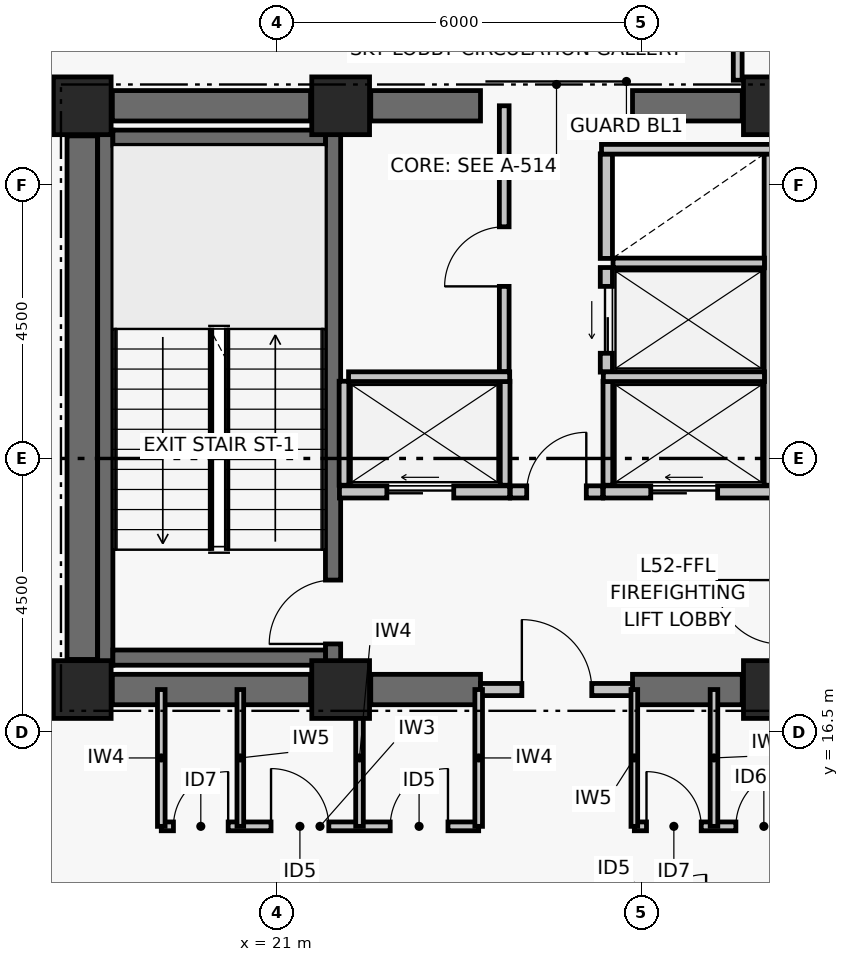
"""IFC4 building model, lengths in metres.
Left out: names, types, materials, properties, quantities, classifications, styles, units other than length and angle.
Written with IfcOpenShell. Run it as: python <this file> out.ifc"""

import sys

from ifc_helpers import new_model, si_unit, direction, frame, frame_2d, origin, origin_2d, place, context, subcontext, project, spatial, rectangle, extrude, element, fill, save


model = new_model("IFC4")
c1 = context("Model", 3, precision=1e-05, world=origin(), true_north=direction((0.0, 1.0)))
c2 = subcontext(c1, "Body", "Model", "MODEL_VIEW")
j1 = project(units=[si_unit("LENGTHUNIT", "METRE"), si_unit("PLANEANGLEUNIT", "RADIAN")], contexts=[c1])
p1 = place(None, origin())
s1 = spatial("IfcSite", under=j1, at=p1, CompositionType="ELEMENT")
p2 = place(p1, origin())
s2 = spatial("IfcBuilding", under=s1, at=p2, CompositionType="ELEMENT")
p3 = place(p2, frame((0.0, 0.0, 206.4)))
s3 = spatial("IfcBuildingStorey", under=s2, at=p3, CompositionType="ELEMENT", Elevation=206.4)
for number, where, z_axis, x_axis in (
    (1, (17.8, 17.2, 0.0), (0.0, 0.0, 1.0), (1.0, 0.0, 0.0)),
    (2, (22.05, 17.2, 0.0), (0.0, 0.0, 1.0), (1.0, 0.0, 0.0)),
    (3, (29.15, 17.2, 0.0), (0.0, 0.0, 1.0), (1.0, 0.0, 0.0)),
    (4, (17.8, 26.8, 0.0), (0.0, 0.0, 1.0), (1.0, 0.0, 0.0)),
    (5, (22.05, 26.8, 0.0), (0.0, 0.0, 1.0), (1.0, 0.0, 0.0)),
    (6, (29.15, 26.8, 0.0), (0.0, 0.0, 1.0), (1.0, 0.0, 0.0)),
):
    element("IfcColumn", number, at=place(p3, frame(where, z_axis=z_axis, x_axis=x_axis)), inside=s3, PredefinedType="COLUMN", context=c2, shape_type="SweptSolid", body=[
        extrude(rectangle(XDim=0.95, YDim=0.95, at=origin_2d()), origin(), (0.0, 0.0, 1.0), 3.72),
    ])
p4 = place(p3, frame((18.295, 17.2, 0.0), z_axis=(0.0, 0.0, 1.0), x_axis=(1.0, 0.0, 0.0)))
e7 = element("IfcWall", 7, at=p4, inside=s3, PredefinedType="SHEAR", context=c2, shape_type="SweptSolid", body=[
    extrude(rectangle(XDim=3.26, YDim=0.5, at=frame_2d((1.63, 0.0))), origin(), (0.0, 0.0, 1.0), 3.5),
])
p5 = place(p3, frame((22.545, 17.2, 0.0), z_axis=(0.0, 0.0, 1.0), x_axis=(1.0, 0.0, 0.0)))
e8 = element("IfcWall", 8, at=p5, inside=s3, PredefinedType="SHEAR", context=c2, shape_type="SweptSolid", body=[
    extrude(rectangle(XDim=1.805, YDim=0.5, at=frame_2d((0.903, 0.0))), origin(), (0.0, 0.0, 1.0), 3.5),
])
p6 = place(p3, frame((26.85, 17.2, 0.0), z_axis=(0.0, 0.0, 1.0), x_axis=(1.0, 0.0, 0.0)))
e9 = element("IfcWall", 9, at=p6, inside=s3, PredefinedType="SHEAR", context=c2, shape_type="SweptSolid", body=[
    extrude(rectangle(XDim=1.805, YDim=0.5, at=frame_2d((0.902, 0.0))), origin(), (0.0, 0.0, 1.0), 3.5),
])
p7 = place(p3, frame((18.295, 26.8, 0.0), z_axis=(0.0, 0.0, 1.0), x_axis=(1.0, 0.0, 0.0)))
e10 = element("IfcWall", 10, at=p7, inside=s3, PredefinedType="SHEAR", context=c2, shape_type="SweptSolid", body=[
    extrude(rectangle(XDim=3.26, YDim=0.5, at=frame_2d((1.63, 0.0))), origin(), (0.0, 0.0, 1.0), 3.5),
])
p8 = place(p3, frame((22.545, 26.8, 0.0), z_axis=(0.0, 0.0, 1.0), x_axis=(1.0, 0.0, 0.0)))
e11 = element("IfcWall", 11, at=p8, inside=s3, PredefinedType="SHEAR", context=c2, shape_type="SweptSolid", body=[
    extrude(rectangle(XDim=1.805, YDim=0.5, at=frame_2d((0.903, 0.0))), origin(), (0.0, 0.0, 1.0), 3.5),
])
p9 = place(p3, frame((26.85, 26.8, 0.0), z_axis=(0.0, 0.0, 1.0), x_axis=(1.0, 0.0, 0.0)))
e12 = element("IfcWall", 12, at=p9, inside=s3, PredefinedType="SHEAR", context=c2, shape_type="SweptSolid", body=[
    extrude(rectangle(XDim=1.805, YDim=0.5, at=frame_2d((0.902, 0.0))), origin(), (0.0, 0.0, 1.0), 3.5),
])
p10 = place(p3, frame((17.8, 17.695, 0.0), z_axis=(0.0, 0.0, 1.0), x_axis=(0.0, 1.0, 0.0)))
e13 = element("IfcWall", 13, at=p10, inside=s3, PredefinedType="SHEAR", context=c2, shape_type="SweptSolid", body=[
    extrude(rectangle(XDim=8.61, YDim=0.5, at=frame_2d((4.305, 0.0))), origin(), (0.0, 0.0, 1.0), 3.5),
])
p11 = place(p3, frame((18.179, 17.6, 0.0), z_axis=(0.0, 0.0, 1.0), x_axis=(0.0, 1.0, 0.0)))
e14 = element("IfcWall", 14, at=p11, inside=s3, PredefinedType="SHEAR", context=c2, shape_type="SweptSolid", body=[
    extrude(rectangle(XDim=8.8, YDim=0.25, at=frame_2d((4.4, 0.0))), origin(), (0.0, 0.0, 1.0), 3.5),
])
p12 = place(p3, frame((21.925, 17.6, 0.0), z_axis=(0.0, 0.0, 1.0), x_axis=(0.0, 1.0, 0.0)))
e15 = element("IfcWall", 15, at=p12, inside=s3, PredefinedType="SHEAR", context=c2, shape_type="SweptSolid", body=[
    extrude(rectangle(XDim=8.8, YDim=0.25, at=frame_2d((4.4, 0.0))), origin(), (0.0, 0.0, 1.0), 3.5),
])
p13 = place(p12, frame((0.35, 0.0, 0.0)))
e16 = element("IfcOpeningElement", 16, at=p13, cuts=e15, PredefinedType="OPENING", context=c2, shape_type="SweptSolid", body=[
    extrude(rectangle(XDim=1.05, YDim=2.08, at=frame_2d((0.525, 1.04))), frame((0.0, 0.135, 0.0), z_axis=(0.0, -1.0, 0.0), x_axis=(1.0, 0.0, 0.0)), (0.0, 0.0, 1.0), 0.27),
])
for number, where, z_axis, x_axis in (
    (17, (18.304, 17.725, 0.0), (0.0, 0.0, 1.0), (1.0, 0.0, 0.0)),
    (18, (18.304, 26.275, 0.0), (0.0, 0.0, 1.0), (1.0, 0.0, 0.0)),
):
    element("IfcWall", number, at=place(p3, frame(where, z_axis=z_axis, x_axis=x_axis)), inside=s3, PredefinedType="SHEAR", context=c2, shape_type="SweptSolid", body=[
        extrude(rectangle(XDim=3.496, YDim=0.25, at=frame_2d((1.748, 0.0))), origin(), (0.0, 0.0, 1.0), 3.5),
    ])
p14 = place(p3, frame((24.35, 17.2, 0.0), z_axis=(0.0, 0.0, 1.0), x_axis=(1.0, 0.0, 0.0)))
e19 = element("IfcWall", 19, at=p14, inside=s3, PredefinedType="PARTITIONING", context=c2, shape_type="SweptSolid", body=[
    extrude(rectangle(XDim=2.5, YDim=0.2, at=frame_2d((1.25, 0.0))), origin(), (0.0, 0.0, 1.0), 2.63),
])
p15 = place(p14, frame((0.68, 0.0, 0.0)))
e20 = element("IfcOpeningElement", 20, at=p15, cuts=e19, PredefinedType="OPENING", context=c2, shape_type="SweptSolid", body=[
    extrude(rectangle(XDim=1.15, YDim=2.08, at=frame_2d((0.575, 1.04))), frame((0.0, 0.11, 0.0), z_axis=(0.0, -1.0, 0.0), x_axis=(1.0, 0.0, 0.0)), (0.0, 0.0, 1.0), 0.22),
])
p16 = place(p3, frame((24.84, 20.45, 0.0), z_axis=(0.0, 0.0, 1.0), x_axis=(1.0, 0.0, 0.0)))
e21 = element("IfcWall", 21, at=p16, inside=s3, PredefinedType="PARTITIONING", context=c2, shape_type="SweptSolid", body=[
    extrude(rectangle(XDim=1.52, YDim=0.2, at=frame_2d((0.76, 0.0))), origin(), (0.0, 0.0, 1.0), 3.5),
])
p17 = place(p16, frame((0.27, 0.0, 0.0)))
e22 = element("IfcOpeningElement", 22, at=p17, cuts=e21, PredefinedType="OPENING", context=c2, shape_type="SweptSolid", body=[
    extrude(rectangle(XDim=0.98, YDim=2.06, at=frame_2d((0.49, 1.03))), frame((0.0, 0.11, 0.0), z_axis=(0.0, -1.0, 0.0), x_axis=(1.0, 0.0, 0.0)), (0.0, 0.0, 1.0), 0.22),
])
p18 = place(p3, frame((22.03, 20.45, 0.0), z_axis=(0.0, 0.0, 1.0), x_axis=(1.0, 0.0, 0.0)))
e23 = element("IfcWall", 23, at=p18, inside=s3, PredefinedType="PARTITIONING", context=c2, shape_type="SweptSolid", body=[
    extrude(rectangle(XDim=2.8, YDim=0.2, at=frame_2d((1.4, 0.0))), origin(), (0.0, 0.0, 1.0), 3.5),
])
p19 = place(p18, frame((0.78, 0.0, 0.0)))
e24 = element("IfcOpeningElement", 24, at=p19, cuts=e23, PredefinedType="OPENING", context=c2, shape_type="SweptSolid", body=[
    extrude(rectangle(XDim=1.1, YDim=2.08, at=frame_2d((0.55, 1.04))), frame((0.0, 0.11, 0.0), z_axis=(0.0, -1.0, 0.0), x_axis=(1.0, 0.0, 0.0)), (0.0, 0.0, 1.0), 0.22),
])
p20 = place(p3, frame((26.37, 20.45, 0.0), z_axis=(0.0, 0.0, 1.0), x_axis=(1.0, 0.0, 0.0)))
e25 = element("IfcWall", 25, at=p20, inside=s3, PredefinedType="PARTITIONING", context=c2, shape_type="SweptSolid", body=[
    extrude(rectangle(XDim=2.8, YDim=0.2, at=frame_2d((1.4, 0.0))), origin(), (0.0, 0.0, 1.0), 3.5),
])
p21 = place(p20, frame((0.78, 0.0, 0.0)))
e26 = element("IfcOpeningElement", 26, at=p21, cuts=e25, PredefinedType="OPENING", context=c2, shape_type="SweptSolid", body=[
    extrude(rectangle(XDim=1.1, YDim=2.08, at=frame_2d((0.55, 1.04))), frame((0.0, 0.11, 0.0), z_axis=(0.0, -1.0, 0.0), x_axis=(1.0, 0.0, 0.0)), (0.0, 0.0, 1.0), 0.22),
])
p22 = place(p3, frame((26.42, 22.42, 0.0), z_axis=(0.0, 0.0, 1.0), x_axis=(0.0, 1.0, 0.0)))
e27 = element("IfcWall", 27, at=p22, inside=s3, PredefinedType="PARTITIONING", context=c2, shape_type="SweptSolid", body=[
    extrude(rectangle(XDim=1.72, YDim=0.2, at=frame_2d((0.86, 0.0))), origin(), (0.0, 0.0, 1.0), 3.5),
])
p23 = place(p22, frame((0.31, 0.0, 0.0)))
e28 = element("IfcOpeningElement", 28, at=p23, cuts=e27, PredefinedType="OPENING", context=c2, shape_type="SweptSolid", body=[
    extrude(rectangle(XDim=1.1, YDim=2.08, at=frame_2d((0.55, 1.04))), frame((0.0, 0.11, 0.0), z_axis=(0.0, -1.0, 0.0), x_axis=(1.0, 0.0, 0.0)), (0.0, 0.0, 1.0), 0.22),
])
p24 = place(p3, frame((26.42, 24.29, 0.0), z_axis=(0.0, 0.0, 1.0), x_axis=(0.0, 1.0, 0.0)))
e29 = element("IfcWall", 29, at=p24, inside=s3, PredefinedType="PARTITIONING", context=c2, shape_type="SweptSolid", body=[
    extrude(rectangle(XDim=1.72, YDim=0.2, at=frame_2d((0.86, 0.0))), origin(), (0.0, 0.0, 1.0), 3.5),
])
for number, where, z_axis, x_axis in (
    (30, (22.105, 20.56, 0.0), (0.0, 0.0, 1.0), (0.0, 1.0, 0.0)),
    (31, (24.755, 20.56, 0.0), (0.0, 0.0, 1.0), (0.0, 1.0, 0.0)),
):
    element("IfcWall", number, at=place(p3, frame(where, z_axis=z_axis, x_axis=x_axis)), inside=s3, PredefinedType="PARTITIONING", context=c2, shape_type="SweptSolid", body=[
        extrude(rectangle(XDim=1.71, YDim=0.16, at=frame_2d((0.855, 0.0))), origin(), (0.0, 0.0, 1.0), 3.5),
    ])
p25 = place(p3, frame((22.18, 22.345, 0.0), z_axis=(0.0, 0.0, 1.0), x_axis=(1.0, 0.0, 0.0)))
e32 = element("IfcWall", 32, at=p25, inside=s3, PredefinedType="PARTITIONING", context=c2, shape_type="SweptSolid", body=[
    extrude(rectangle(XDim=2.65, YDim=0.16, at=frame_2d((1.325, 0.0))), origin(), (0.0, 0.0, 1.0), 3.5),
])
p26 = place(p3, frame((29.095, 20.56, 0.0), z_axis=(0.0, 0.0, 1.0), x_axis=(0.0, 1.0, 0.0)))
e33 = element("IfcWall", 33, at=p26, inside=s3, PredefinedType="PARTITIONING", context=c2, shape_type="SweptSolid", body=[
    extrude(rectangle(XDim=5.45, YDim=0.16, at=frame_2d((2.725, 0.0))), origin(), (0.0, 0.0, 1.0), 3.5),
])
p27 = place(p3, frame((26.445, 20.56, 0.0), z_axis=(0.0, 0.0, 1.0), x_axis=(0.0, 1.0, 0.0)))
e34 = element("IfcWall", 34, at=p27, inside=s3, PredefinedType="PARTITIONING", context=c2, shape_type="SweptSolid", body=[
    extrude(rectangle(XDim=1.71, YDim=0.16, at=frame_2d((0.855, 0.0))), origin(), (0.0, 0.0, 1.0), 3.5),
])
p28 = place(p3, frame((26.37, 22.345, 0.0), z_axis=(0.0, 0.0, 1.0), x_axis=(1.0, 0.0, 0.0)))
e35 = element("IfcWall", 35, at=p28, inside=s3, PredefinedType="PARTITIONING", context=c2, shape_type="SweptSolid", body=[
    extrude(rectangle(XDim=2.65, YDim=0.16, at=frame_2d((1.325, 0.0))), origin(), (0.0, 0.0, 1.0), 3.5),
])
p29 = place(p3, frame((26.53, 24.215, 0.0), z_axis=(0.0, 0.0, 1.0), x_axis=(1.0, 0.0, 0.0)))
e36 = element("IfcWall", 36, at=p29, inside=s3, PredefinedType="PARTITIONING", context=c2, shape_type="SweptSolid", body=[
    extrude(rectangle(XDim=2.49, YDim=0.16, at=frame_2d((1.245, 0.0))), origin(), (0.0, 0.0, 1.0), 3.5),
])
p30 = place(p3, frame((26.34, 26.085, 0.0), z_axis=(0.0, 0.0, 1.0), x_axis=(1.0, 0.0, 0.0)))
e37 = element("IfcWall", 37, at=p30, inside=s3, PredefinedType="PARTITIONING", context=c2, shape_type="SweptSolid", body=[
    extrude(rectangle(XDim=2.83, YDim=0.16, at=frame_2d((1.415, 0.0))), origin(), (0.0, 0.0, 1.0), 3.5),
])
p31 = place(p3, frame((24.74, 22.43, 0.0), z_axis=(0.0, 0.0, 1.0), x_axis=(0.0, 1.0, 0.0)))
e38 = element("IfcWall", 38, at=p31, inside=s3, PredefinedType="PARTITIONING", context=c2, shape_type="SweptSolid", body=[
    extrude(rectangle(XDim=4.37, YDim=0.16, at=frame_2d((2.185, 0.0))), origin(), (0.0, 0.0, 1.0), 2.21),
])
p32 = place(p31, frame((1.4, 0.0, 0.0)))
e39 = element("IfcOpeningElement", 39, at=p32, cuts=e38, PredefinedType="OPENING", context=c2, shape_type="SweptSolid", body=[
    extrude(rectangle(XDim=0.98, YDim=2.06, at=frame_2d((0.49, 1.03))), frame((0.0, 0.09, 0.0), z_axis=(0.0, -1.0, 0.0), x_axis=(1.0, 0.0, 0.0)), (0.0, 0.0, 1.0), 0.18),
])
p33 = place(p3, frame((19.1, 14.95, 0.0), z_axis=(0.0, 0.0, 1.0), x_axis=(1.0, 0.0, 0.0)))
e40 = element("IfcWall", 40, at=p33, inside=s3, PredefinedType="PARTITIONING", context=c2, shape_type="SweptSolid", body=[
    extrude(rectangle(XDim=5.22, YDim=0.145, at=frame_2d((2.61, 0.0))), origin(), (0.0, 0.0, 1.0), 2.73),
])
p34 = place(p33, frame((0.2, 0.0, 0.0)))
e41 = element("IfcOpeningElement", 41, at=p34, cuts=e40, PredefinedType="OPENING", context=c2, shape_type="SweptSolid", body=[
    extrude(rectangle(XDim=0.9, YDim=2.02, at=frame_2d((0.45, 1.01))), frame((0.0, 0.083, 0.0), z_axis=(0.0, -1.0, 0.0), x_axis=(1.0, 0.0, 0.0)), (0.0, 0.0, 1.0), 0.165),
])
p35 = place(p33, frame((1.805, 0.0, 0.0)))
e42 = element("IfcOpeningElement", 42, at=p35, cuts=e40, PredefinedType="OPENING", context=c2, shape_type="SweptSolid", body=[
    extrude(rectangle(XDim=0.95, YDim=2.06, at=frame_2d((0.475, 1.03))), frame((0.0, 0.083, 0.0), z_axis=(0.0, -1.0, 0.0), x_axis=(1.0, 0.0, 0.0)), (0.0, 0.0, 1.0), 0.165),
])
p36 = place(p33, frame((3.765, 0.0, 0.0)))
e43 = element("IfcOpeningElement", 43, at=p36, cuts=e40, PredefinedType="OPENING", context=c2, shape_type="SweptSolid", body=[
    extrude(rectangle(XDim=0.95, YDim=2.06, at=frame_2d((0.475, 1.03))), frame((0.0, 0.083, 0.0), z_axis=(0.0, -1.0, 0.0), x_axis=(1.0, 0.0, 0.0)), (0.0, 0.0, 1.0), 0.165),
])
p37 = place(p3, frame((26.88, 14.95, 0.0), z_axis=(0.0, 0.0, 1.0), x_axis=(1.0, 0.0, 0.0)))
e44 = element("IfcWall", 44, at=p37, inside=s3, PredefinedType="PARTITIONING", context=c2, shape_type="SweptSolid", body=[
    extrude(rectangle(XDim=4.22, YDim=0.145, at=frame_2d((2.11, 0.0))), origin(), (0.0, 0.0, 1.0), 2.93),
])
p38 = place(p37, frame((0.2, 0.0, 0.0)))
e45 = element("IfcOpeningElement", 45, at=p38, cuts=e44, PredefinedType="OPENING", context=c2, shape_type="SweptSolid", body=[
    extrude(rectangle(XDim=0.9, YDim=2.02, at=frame_2d((0.45, 1.01))), frame((0.0, 0.083, 0.0), z_axis=(0.0, -1.0, 0.0), x_axis=(1.0, 0.0, 0.0)), (0.0, 0.0, 1.0), 0.165),
])
p39 = place(p37, frame((1.67, 0.0, 0.0)))
e46 = element("IfcOpeningElement", 46, at=p39, cuts=e44, PredefinedType="OPENING", context=c2, shape_type="SweptSolid", body=[
    extrude(rectangle(XDim=0.92, YDim=2.05, at=frame_2d((0.46, 1.025))), frame((0.0, 0.083, 0.0), z_axis=(0.0, -1.0, 0.0), x_axis=(1.0, 0.0, 0.0)), (0.0, 0.0, 1.0), 0.165),
])
p40 = place(p37, frame((3.14, 0.0, 0.0)))
e47 = element("IfcOpeningElement", 47, at=p40, cuts=e44, PredefinedType="OPENING", context=c2, shape_type="SweptSolid", body=[
    extrude(rectangle(XDim=0.9, YDim=2.02, at=frame_2d((0.45, 1.01))), frame((0.0, 0.083, 0.0), z_axis=(0.0, -1.0, 0.0), x_axis=(1.0, 0.0, 0.0)), (0.0, 0.0, 1.0), 0.165),
])
p41 = place(p3, frame((19.1, 14.95, 0.0), z_axis=(0.0, 0.0, 1.0), x_axis=(0.0, 1.0, 0.0)))
e48 = element("IfcWall", 48, at=p41, inside=s3, PredefinedType="PARTITIONING", context=c2, shape_type="SweptSolid", body=[
    extrude(rectangle(XDim=2.25, YDim=0.125, at=frame_2d((1.125, 0.0))), origin(), (0.0, 0.0, 1.0), 2.63),
])
p42 = place(p3, frame((20.4, 14.95, 0.0), z_axis=(0.0, 0.0, 1.0), x_axis=(0.0, 1.0, 0.0)))
e49 = element("IfcWall", 49, at=p42, inside=s3, PredefinedType="PARTITIONING", context=c2, shape_type="SweptSolid", body=[
    extrude(rectangle(XDim=2.25, YDim=0.11, at=frame_2d((1.125, 0.0))), origin(), (0.0, 0.0, 1.0), 2.63),
])
for number, where, z_axis, x_axis in (
    (50, (22.36, 14.95, 0.0), (0.0, 0.0, 1.0), (0.0, 1.0, 0.0)),
    (51, (24.32, 14.95, 0.0), (0.0, 0.0, 1.0), (0.0, 1.0, 0.0)),
):
    element("IfcWall", number, at=place(p3, frame(where, z_axis=z_axis, x_axis=x_axis)), inside=s3, PredefinedType="PARTITIONING", context=c2, shape_type="SweptSolid", body=[
        extrude(rectangle(XDim=2.25, YDim=0.125, at=frame_2d((1.125, 0.0))), origin(), (0.0, 0.0, 1.0), 2.63),
    ])
p43 = place(p3, frame((26.88, 14.95, 0.0), z_axis=(0.0, 0.0, 1.0), x_axis=(0.0, 1.0, 0.0)))
e52 = element("IfcWall", 52, at=p43, inside=s3, PredefinedType="PARTITIONING", context=c2, shape_type="SweptSolid", body=[
    extrude(rectangle(XDim=2.25, YDim=0.11, at=frame_2d((1.125, 0.0))), origin(), (0.0, 0.0, 1.0), 2.63),
])
p44 = place(p3, frame((28.19, 14.95, 0.0), z_axis=(0.0, 0.0, 1.0), x_axis=(0.0, 1.0, 0.0)))
e53 = element("IfcWall", 53, at=p44, inside=s3, PredefinedType="PARTITIONING", context=c2, shape_type="SweptSolid", body=[
    extrude(rectangle(XDim=2.25, YDim=0.125, at=frame_2d((1.125, 0.0))), origin(), (0.0, 0.0, 1.0), 2.63),
])
p45 = place(p3, frame((28.58, 27.22, 0.0), z_axis=(0.0, 0.0, 1.0), x_axis=(0.0, 1.0, 0.0)))
e54 = element("IfcWall", 54, at=p45, inside=s3, PredefinedType="PARTITIONING", context=c2, shape_type="SweptSolid", body=[
    extrude(rectangle(XDim=1.48, YDim=0.145, at=frame_2d((0.74, 0.0))), origin(), (0.0, 0.0, 1.0), 2.63),
])
p46 = place(p13, origin())
e55 = element("IfcDoor", 55, at=p46, inside=s3, OperationType="SINGLE_SWING_LEFT", PredefinedType="DOOR", context=c2, shape_type="SweptSolid", body=[
    extrude(rectangle(XDim=1.05, YDim=2.08, at=frame_2d((0.525, 1.04))), frame((0.0, 0.025, 0.0), z_axis=(0.0, -1.0, 0.0), x_axis=(1.0, 0.0, 0.0)), (0.0, 0.0, 1.0), 0.05),
])
fill(e16, e55)
p47 = place(p15, origin())
e56 = element("IfcDoor", 56, at=p47, inside=s3, OperationType="SINGLE_SWING_LEFT", PredefinedType="DOOR", context=c2, shape_type="SweptSolid", body=[
    extrude(rectangle(XDim=1.15, YDim=2.08, at=frame_2d((0.575, 1.04))), frame((0.0, 0.025, 0.0), z_axis=(0.0, -1.0, 0.0), x_axis=(1.0, 0.0, 0.0)), (0.0, 0.0, 1.0), 0.05),
])
fill(e20, e56)
p48 = place(p17, origin())
e57 = element("IfcDoor", 57, at=p48, inside=s3, OperationType="SINGLE_SWING_RIGHT", PredefinedType="DOOR", context=c2, shape_type="SweptSolid", body=[
    extrude(rectangle(XDim=0.98, YDim=2.06, at=frame_2d((0.49, 1.03))), frame((0.0, 0.025, 0.0), z_axis=(0.0, -1.0, 0.0), x_axis=(1.0, 0.0, 0.0)), (0.0, 0.0, 1.0), 0.05),
])
fill(e22, e57)
p49 = place(p19, origin())
e58 = element("IfcDoor", 58, at=p49, inside=s3, OperationType="DOUBLE_DOOR_SLIDING", PredefinedType="DOOR", context=c2, shape_type="SweptSolid", body=[
    extrude(rectangle(XDim=1.1, YDim=2.08, at=frame_2d((0.55, 1.04))), frame((0.0, 0.025, 0.0), z_axis=(0.0, -1.0, 0.0), x_axis=(1.0, 0.0, 0.0)), (0.0, 0.0, 1.0), 0.05),
])
fill(e24, e58)
p50 = place(p21, origin())
e59 = element("IfcDoor", 59, at=p50, inside=s3, OperationType="DOUBLE_DOOR_SLIDING", PredefinedType="DOOR", context=c2, shape_type="SweptSolid", body=[
    extrude(rectangle(XDim=1.1, YDim=2.08, at=frame_2d((0.55, 1.04))), frame((0.0, 0.025, 0.0), z_axis=(0.0, -1.0, 0.0), x_axis=(1.0, 0.0, 0.0)), (0.0, 0.0, 1.0), 0.05),
])
fill(e26, e59)
p51 = place(p23, origin())
e60 = element("IfcDoor", 60, at=p51, inside=s3, OperationType="DOUBLE_DOOR_SLIDING", PredefinedType="DOOR", context=c2, shape_type="SweptSolid", body=[
    extrude(rectangle(XDim=1.1, YDim=2.08, at=frame_2d((0.55, 1.04))), frame((0.0, 0.025, 0.0), z_axis=(0.0, -1.0, 0.0), x_axis=(1.0, 0.0, 0.0)), (0.0, 0.0, 1.0), 0.05),
])
fill(e28, e60)
p52 = place(p32, origin())
e61 = element("IfcDoor", 61, at=p52, inside=s3, OperationType="SINGLE_SWING_LEFT", PredefinedType="DOOR", context=c2, shape_type="SweptSolid", body=[
    extrude(rectangle(XDim=0.98, YDim=2.06, at=frame_2d((0.49, 1.03))), frame((0.0, 0.025, 0.0), z_axis=(0.0, -1.0, 0.0), x_axis=(1.0, 0.0, 0.0)), (0.0, 0.0, 1.0), 0.05),
])
fill(e39, e61)
p53 = place(p34, origin())
e62 = element("IfcDoor", 62, at=p53, inside=s3, OperationType="SINGLE_SWING_RIGHT", PredefinedType="DOOR", context=c2, shape_type="SweptSolid", body=[
    extrude(rectangle(XDim=0.9, YDim=2.02, at=frame_2d((0.45, 1.01))), frame((0.0, 0.025, 0.0), z_axis=(0.0, -1.0, 0.0), x_axis=(1.0, 0.0, 0.0)), (0.0, 0.0, 1.0), 0.05),
])
fill(e41, e62)
p54 = place(p35, origin())
e63 = element("IfcDoor", 63, at=p54, inside=s3, OperationType="SINGLE_SWING_LEFT", PredefinedType="DOOR", context=c2, shape_type="SweptSolid", body=[
    extrude(rectangle(XDim=0.95, YDim=2.06, at=frame_2d((0.475, 1.03))), frame((0.0, 0.025, 0.0), z_axis=(0.0, -1.0, 0.0), x_axis=(1.0, 0.0, 0.0)), (0.0, 0.0, 1.0), 0.05),
])
fill(e42, e63)
p55 = place(p36, origin())
e64 = element("IfcDoor", 64, at=p55, inside=s3, OperationType="SINGLE_SWING_RIGHT", PredefinedType="DOOR", context=c2, shape_type="SweptSolid", body=[
    extrude(rectangle(XDim=0.95, YDim=2.06, at=frame_2d((0.475, 1.03))), frame((0.0, 0.025, 0.0), z_axis=(0.0, -1.0, 0.0), x_axis=(1.0, 0.0, 0.0)), (0.0, 0.0, 1.0), 0.05),
])
fill(e43, e64)
p56 = place(p38, origin())
e65 = element("IfcDoor", 65, at=p56, inside=s3, OperationType="SINGLE_SWING_LEFT", PredefinedType="DOOR", context=c2, shape_type="SweptSolid", body=[
    extrude(rectangle(XDim=0.9, YDim=2.02, at=frame_2d((0.45, 1.01))), frame((0.0, 0.025, 0.0), z_axis=(0.0, -1.0, 0.0), x_axis=(1.0, 0.0, 0.0)), (0.0, 0.0, 1.0), 0.05),
])
fill(e45, e65)
p57 = place(p39, origin())
e66 = element("IfcDoor", 66, at=p57, inside=s3, OperationType="SINGLE_SWING_RIGHT", PredefinedType="DOOR", context=c2, shape_type="SweptSolid", body=[
    extrude(rectangle(XDim=0.92, YDim=2.05, at=frame_2d((0.46, 1.025))), frame((0.0, 0.025, 0.0), z_axis=(0.0, -1.0, 0.0), x_axis=(1.0, 0.0, 0.0)), (0.0, 0.0, 1.0), 0.05),
])
fill(e46, e66)
save(model, sys.argv[1])
